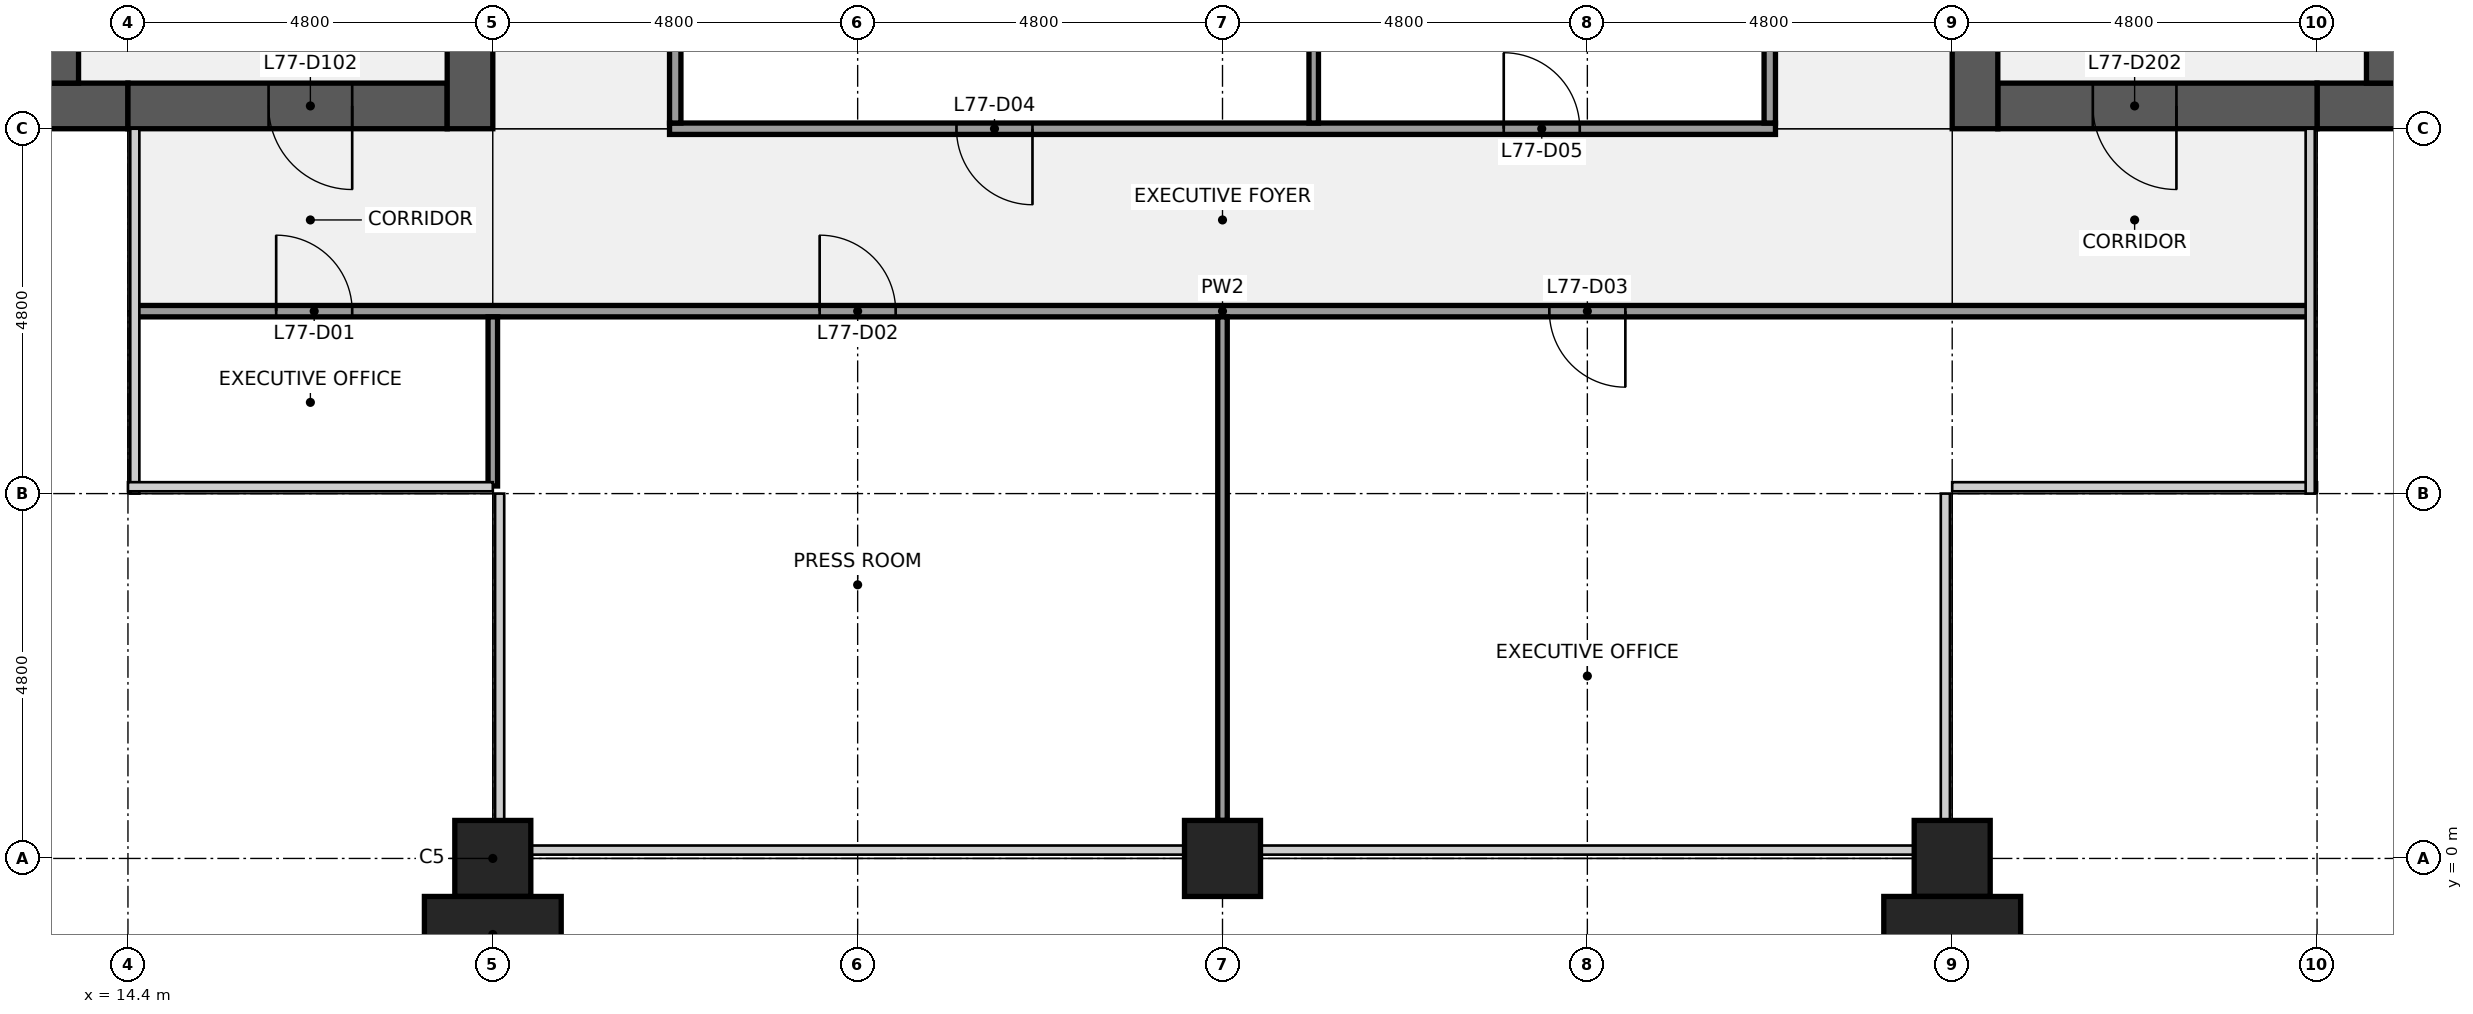
"""IFC4 building model, lengths in metres.
Left out: names, types, materials, properties, quantities, classifications, styles, units other than length and angle.
Written with IfcOpenShell. Run it as: python <this file> out.ifc"""

import sys

from ifc_helpers import new_model, si_unit, direction, frame, frame_2d, origin, origin_2d, place, context, subcontext, project, spatial, rectangle, extrude, element, fill, save


model = new_model("IFC4")
c1 = context("Model", 3, precision=1e-05, world=origin(), true_north=direction((0.0, 1.0)))
c2 = subcontext(c1, "Body", "Model", "MODEL_VIEW")
j1 = project(units=[si_unit("LENGTHUNIT", "METRE"), si_unit("PLANEANGLEUNIT", "RADIAN")], contexts=[c1])
p1 = place(None, origin())
s1 = spatial("IfcSite", under=j1, at=p1, CompositionType="ELEMENT")
p2 = place(p1, origin())
s2 = spatial("IfcBuilding", under=s1, at=p2, CompositionType="ELEMENT")
p3 = place(p2, frame((0.0, 0.0, 346.3)))
s3 = spatial("IfcBuildingStorey", under=s2, at=p3, CompositionType="ELEMENT", Elevation=346.3)
for number, where, z_axis, x_axis in (
    (1, (19.2, 0.0, 0.0), (0.0, 0.0, 1.0), (1.0, 0.0, 0.0)),
    (2, (28.8, 0.0, 0.0), (0.0, 0.0, 1.0), (1.0, 0.0, 0.0)),
    (3, (38.4, 0.0, 0.0), (0.0, 0.0, 1.0), (1.0, 0.0, 0.0)),
):
    element("IfcColumn", number, at=place(p3, frame(where, z_axis=z_axis, x_axis=x_axis)), inside=s3, PredefinedType="COLUMN", context=c2, shape_type="SweptSolid", body=[
        extrude(rectangle(XDim=1.0, YDim=1.0, at=origin_2d()), origin(), (0.0, 0.0, 1.0), 4.0),
    ])
p4 = place(p3, frame((14.4, 9.9, 0.0), z_axis=(0.0, 0.0, 1.0), x_axis=(-1.0, 0.0, 0.0)))
e4 = element("IfcWall", 4, at=p4, inside=s3, PredefinedType="SHEAR", context=c2, shape_type="SweptSolid", body=[
    extrude(rectangle(XDim=13.8, YDim=0.6, at=frame_2d((6.9, 0.0))), origin(), (0.0, 0.0, 1.0), 3.84),
])
p5 = place(p4, frame((6.3, 0.0, 0.9)))
e5 = element("IfcOpeningElement", 5, at=p5, cuts=e4, PredefinedType="OPENING", context=c2, shape_type="SweptSolid", body=[
    extrude(rectangle(XDim=1.8, YDim=1.5, at=frame_2d((0.9, 0.75))), frame((0.0, 0.31, 0.0), z_axis=(0.0, -1.0, 0.0), x_axis=(1.0, 0.0, 0.0)), (0.0, 0.0, 1.0), 0.62),
])
p6 = place(p4, frame((1.5, 0.0, 0.9)))
e6 = element("IfcOpeningElement", 6, at=p6, cuts=e4, PredefinedType="OPENING", context=c2, shape_type="SweptSolid", body=[
    extrude(rectangle(XDim=1.8, YDim=1.5, at=frame_2d((0.9, 0.75))), frame((0.0, 0.31, 0.0), z_axis=(0.0, -1.0, 0.0), x_axis=(1.0, 0.0, 0.0)), (0.0, 0.0, 1.0), 0.62),
])
p7 = place(p3, frame((18.6, 9.9, 0.0), z_axis=(0.0, 0.0, 1.0), x_axis=(-1.0, 0.0, 0.0)))
e7 = element("IfcWall", 7, at=p7, inside=s3, PredefinedType="SHEAR", context=c2, shape_type="SweptSolid", body=[
    extrude(rectangle(XDim=4.2, YDim=0.6, at=frame_2d((2.1, 0.0))), origin(), (0.0, 0.0, 1.0), 3.84),
])
p8 = place(p7, frame((1.25, 0.0, 0.0)))
e8 = element("IfcOpeningElement", 8, at=p8, cuts=e7, PredefinedType="OPENING", context=c2, shape_type="SweptSolid", body=[
    extrude(rectangle(XDim=1.1, YDim=2.1, at=frame_2d((0.55, 1.05))), frame((0.0, 0.31, 0.0), z_axis=(0.0, -1.0, 0.0), x_axis=(1.0, 0.0, 0.0)), (0.0, 0.0, 1.0), 0.62),
])
p9 = place(p3, frame((18.9, 38.4, 0.0), z_axis=(0.0, 0.0, 1.0), x_axis=(0.0, -1.0, 0.0)))
e9 = element("IfcWall", 9, at=p9, inside=s3, PredefinedType="SHEAR", context=c2, shape_type="SweptSolid", body=[
    extrude(rectangle(XDim=28.8, YDim=0.6, at=frame_2d((14.4, 0.0))), origin(), (0.0, 0.0, 1.0), 3.84),
])
p10 = place(p9, frame((18.3, 0.0, 0.0)))
e10 = element("IfcOpeningElement", 10, at=p10, cuts=e9, PredefinedType="OPENING", context=c2, shape_type="SweptSolid", body=[
    extrude(rectangle(XDim=1.8, YDim=2.1, at=frame_2d((0.9, 1.05))), frame((0.0, 0.31, 0.0), z_axis=(0.0, -1.0, 0.0), x_axis=(1.0, 0.0, 0.0)), (0.0, 0.0, 1.0), 0.62),
])
p11 = place(p9, frame((8.7, 0.0, 0.0)))
e11 = element("IfcOpeningElement", 11, at=p11, cuts=e9, PredefinedType="OPENING", context=c2, shape_type="SweptSolid", body=[
    extrude(rectangle(XDim=1.8, YDim=2.1, at=frame_2d((0.9, 1.05))), frame((0.0, 0.31, 0.0), z_axis=(0.0, -1.0, 0.0), x_axis=(1.0, 0.0, 0.0)), (0.0, 0.0, 1.0), 0.62),
])
p12 = place(p3, frame((6.25, 10.5, 0.0), z_axis=(0.0, 0.0, 1.0), x_axis=(1.0, 0.0, 0.0)))
e12 = element("IfcWall", 12, at=p12, inside=s3, PredefinedType="SHEAR", context=c2, shape_type="SweptSolid", body=[
    extrude(rectangle(XDim=7.5, YDim=0.6, at=frame_2d((3.75, 0.0))), origin(), (0.0, 0.0, 1.0), 3.84),
])
p13 = place(p3, frame((57.0, 9.9, 0.0), z_axis=(0.0, 0.0, 1.0), x_axis=(-1.0, 0.0, 0.0)))
e13 = element("IfcWall", 13, at=p13, inside=s3, PredefinedType="SHEAR", context=c2, shape_type="SweptSolid", body=[
    extrude(rectangle(XDim=13.8, YDim=0.6, at=frame_2d((6.9, 0.0))), origin(), (0.0, 0.0, 1.0), 3.84),
])
p14 = place(p13, frame((5.7, 0.0, 0.9)))
e14 = element("IfcOpeningElement", 14, at=p14, cuts=e13, PredefinedType="OPENING", context=c2, shape_type="SweptSolid", body=[
    extrude(rectangle(XDim=1.8, YDim=1.5, at=frame_2d((0.9, 0.75))), frame((0.0, 0.31, 0.0), z_axis=(0.0, -1.0, 0.0), x_axis=(1.0, 0.0, 0.0)), (0.0, 0.0, 1.0), 0.62),
])
p15 = place(p13, frame((10.5, 0.0, 0.9)))
e15 = element("IfcOpeningElement", 15, at=p15, cuts=e13, PredefinedType="OPENING", context=c2, shape_type="SweptSolid", body=[
    extrude(rectangle(XDim=1.8, YDim=1.5, at=frame_2d((0.9, 0.75))), frame((0.0, 0.31, 0.0), z_axis=(0.0, -1.0, 0.0), x_axis=(1.0, 0.0, 0.0)), (0.0, 0.0, 1.0), 0.62),
])
p16 = place(p3, frame((43.2, 9.9, 0.0), z_axis=(0.0, 0.0, 1.0), x_axis=(-1.0, 0.0, 0.0)))
e16 = element("IfcWall", 16, at=p16, inside=s3, PredefinedType="SHEAR", context=c2, shape_type="SweptSolid", body=[
    extrude(rectangle(XDim=4.2, YDim=0.6, at=frame_2d((2.1, 0.0))), origin(), (0.0, 0.0, 1.0), 3.84),
])
p17 = place(p16, frame((1.85, 0.0, 0.0)))
e17 = element("IfcOpeningElement", 17, at=p17, cuts=e16, PredefinedType="OPENING", context=c2, shape_type="SweptSolid", body=[
    extrude(rectangle(XDim=1.1, YDim=2.1, at=frame_2d((0.55, 1.05))), frame((0.0, 0.31, 0.0), z_axis=(0.0, -1.0, 0.0), x_axis=(1.0, 0.0, 0.0)), (0.0, 0.0, 1.0), 0.62),
])
p18 = place(p3, frame((38.7, 9.6, 0.0), z_axis=(0.0, 0.0, 1.0), x_axis=(0.0, 1.0, 0.0)))
e18 = element("IfcWall", 18, at=p18, inside=s3, PredefinedType="SHEAR", context=c2, shape_type="SweptSolid", body=[
    extrude(rectangle(XDim=28.8, YDim=0.6, at=frame_2d((14.4, 0.0))), origin(), (0.0, 0.0, 1.0), 3.84),
])
p19 = place(p18, frame((8.7, 0.0, 0.0)))
e19 = element("IfcOpeningElement", 19, at=p19, cuts=e18, PredefinedType="OPENING", context=c2, shape_type="SweptSolid", body=[
    extrude(rectangle(XDim=1.8, YDim=2.1, at=frame_2d((0.9, 1.05))), frame((0.0, 0.31, 0.0), z_axis=(0.0, -1.0, 0.0), x_axis=(1.0, 0.0, 0.0)), (0.0, 0.0, 1.0), 0.62),
])
p20 = place(p18, frame((18.3, 0.0, 0.0)))
e20 = element("IfcOpeningElement", 20, at=p20, cuts=e18, PredefinedType="OPENING", context=c2, shape_type="SweptSolid", body=[
    extrude(rectangle(XDim=1.8, YDim=2.1, at=frame_2d((0.9, 1.05))), frame((0.0, 0.31, 0.0), z_axis=(0.0, -1.0, 0.0), x_axis=(1.0, 0.0, 0.0)), (0.0, 0.0, 1.0), 0.62),
])
p21 = place(p3, frame((43.85, 10.5, 0.0), z_axis=(0.0, 0.0, 1.0), x_axis=(1.0, 0.0, 0.0)))
e21 = element("IfcWall", 21, at=p21, inside=s3, PredefinedType="SHEAR", context=c2, shape_type="SweptSolid", body=[
    extrude(rectangle(XDim=7.5, YDim=0.6, at=frame_2d((3.75, 0.0))), origin(), (0.0, 0.0, 1.0), 3.84),
])
p22 = place(p3, frame((14.5, 7.2, 0.0), z_axis=(0.0, 0.0, 1.0), x_axis=(1.0, 0.0, 0.0)))
e22 = element("IfcWall", 22, at=p22, inside=s3, PredefinedType="PARTITIONING", context=c2, shape_type="SweptSolid", body=[
    extrude(rectangle(XDim=28.6, YDim=0.15, at=frame_2d((14.3, 0.0))), origin(), (0.0, 0.0, 1.0), 2.849),
])
p23 = place(p22, frame((1.85, 0.0, 0.0)))
e23 = element("IfcOpeningElement", 23, at=p23, cuts=e22, PredefinedType="OPENING", context=c2, shape_type="SweptSolid", body=[
    extrude(rectangle(XDim=1.0, YDim=2.1, at=frame_2d((0.5, 1.05))), frame((0.0, 0.085, 0.0), z_axis=(0.0, -1.0, 0.0), x_axis=(1.0, 0.0, 0.0)), (0.0, 0.0, 1.0), 0.17),
])
p24 = place(p22, frame((9.0, 0.0, 0.0)))
e24 = element("IfcOpeningElement", 24, at=p24, cuts=e22, PredefinedType="OPENING", context=c2, shape_type="SweptSolid", body=[
    extrude(rectangle(XDim=1.0, YDim=2.1, at=frame_2d((0.5, 1.05))), frame((0.0, 0.085, 0.0), z_axis=(0.0, -1.0, 0.0), x_axis=(1.0, 0.0, 0.0)), (0.0, 0.0, 1.0), 0.17),
])
p25 = place(p22, frame((18.6, 0.0, 0.0)))
e25 = element("IfcOpeningElement", 25, at=p25, cuts=e22, PredefinedType="OPENING", context=c2, shape_type="SweptSolid", body=[
    extrude(rectangle(XDim=1.0, YDim=2.1, at=frame_2d((0.5, 1.05))), frame((0.0, 0.085, 0.0), z_axis=(0.0, -1.0, 0.0), x_axis=(1.0, 0.0, 0.0)), (0.0, 0.0, 1.0), 0.17),
])
p26 = place(p3, frame((21.525, 9.6, 0.0), z_axis=(0.0, 0.0, 1.0), x_axis=(1.0, 0.0, 0.0)))
e26 = element("IfcWall", 26, at=p26, inside=s3, PredefinedType="PARTITIONING", context=c2, shape_type="SweptSolid", body=[
    extrude(rectangle(XDim=14.55, YDim=0.15, at=frame_2d((7.275, 0.0))), origin(), (0.0, 0.0, 1.0), 2.849),
])
p27 = place(p26, frame((3.775, 0.0, 0.0)))
e27 = element("IfcOpeningElement", 27, at=p27, cuts=e26, PredefinedType="OPENING", context=c2, shape_type="SweptSolid", body=[
    extrude(rectangle(XDim=1.0, YDim=2.1, at=frame_2d((0.5, 1.05))), frame((0.0, 0.085, 0.0), z_axis=(0.0, -1.0, 0.0), x_axis=(1.0, 0.0, 0.0)), (0.0, 0.0, 1.0), 0.17),
])
p28 = place(p26, frame((10.975, 0.0, 0.0)))
e28 = element("IfcOpeningElement", 28, at=p28, cuts=e26, PredefinedType="OPENING", context=c2, shape_type="SweptSolid", body=[
    extrude(rectangle(XDim=1.0, YDim=2.1, at=frame_2d((0.5, 1.05))), frame((0.0, 0.085, 0.0), z_axis=(0.0, -1.0, 0.0), x_axis=(1.0, 0.0, 0.0)), (0.0, 0.0, 1.0), 0.17),
])
p29 = place(p3, frame((19.2, 4.9, 0.0), z_axis=(0.0, 0.0, 1.0), x_axis=(0.0, 1.0, 0.0)))
e29 = element("IfcWall", 29, at=p29, inside=s3, PredefinedType="PARTITIONING", context=c2, shape_type="SweptSolid", body=[
    extrude(rectangle(XDim=2.225, YDim=0.125, at=frame_2d((1.113, 0.0))), origin(), (0.0, 0.0, 1.0), 2.849),
])
p30 = place(p3, frame((21.6, 9.675, 0.0), z_axis=(0.0, 0.0, 1.0), x_axis=(0.0, 1.0, 0.0)))
e30 = element("IfcWall", 30, at=p30, inside=s3, PredefinedType="PARTITIONING", context=c2, shape_type="SweptSolid", body=[
    extrude(rectangle(XDim=4.65, YDim=0.15, at=frame_2d((2.325, 0.0))), origin(), (0.0, 0.0, 1.0), 2.849),
])
p31 = place(p3, frame((28.8, 0.5, 0.0), z_axis=(0.0, 0.0, 1.0), x_axis=(0.0, 1.0, 0.0)))
e31 = element("IfcWall", 31, at=p31, inside=s3, PredefinedType="PARTITIONING", context=c2, shape_type="SweptSolid", body=[
    extrude(rectangle(XDim=6.625, YDim=0.125, at=frame_2d((3.312, 0.0))), origin(), (0.0, 0.0, 1.0), 2.849),
])
p32 = place(p3, frame((30.0, 9.675, 0.0), z_axis=(0.0, 0.0, 1.0), x_axis=(0.0, 1.0, 0.0)))
e32 = element("IfcWall", 32, at=p32, inside=s3, PredefinedType="PARTITIONING", context=c2, shape_type="SweptSolid", body=[
    extrude(rectangle(XDim=4.662, YDim=0.125, at=frame_2d((2.331, 0.0))), origin(), (0.0, 0.0, 1.0), 2.849),
])
p33 = place(p3, frame((36.0, 9.675, 0.0), z_axis=(0.0, 0.0, 1.0), x_axis=(0.0, 1.0, 0.0)))
e33 = element("IfcWall", 33, at=p33, inside=s3, PredefinedType="PARTITIONING", context=c2, shape_type="SweptSolid", body=[
    extrude(rectangle(XDim=4.65, YDim=0.15, at=frame_2d((2.325, 0.0))), origin(), (0.0, 0.0, 1.0), 2.849),
])
for number, where, z_axis, x_axis in (
    (34, (19.2, -1.0, 0.0), (0.0, 0.0, 1.0), (1.0, 0.0, 0.0)),
    (35, (38.4, -1.0, 0.0), (0.0, 0.0, 1.0), (1.0, 0.0, 0.0)),
):
    element("IfcColumn", number, at=place(p3, frame(where, z_axis=z_axis, x_axis=x_axis)), inside=s3, PredefinedType="PILASTER", context=c2, shape_type="SweptSolid", body=[
        extrude(rectangle(XDim=1.8, YDim=1.0, at=origin_2d()), origin(), (0.0, 0.0, 1.0), 4.0),
    ])
p34 = place(p8, origin())
e36 = element("IfcDoor", 36, at=p34, inside=s3, OperationType="SINGLE_SWING_LEFT", PredefinedType="DOOR", context=c2, shape_type="SweptSolid", body=[
    extrude(rectangle(XDim=1.1, YDim=2.1, at=frame_2d((0.55, 1.05))), frame((0.0, 0.025, 0.0), z_axis=(0.0, -1.0, 0.0), x_axis=(1.0, 0.0, 0.0)), (0.0, 0.0, 1.0), 0.05),
])
fill(e8, e36)
p35 = place(p17, origin())
e37 = element("IfcDoor", 37, at=p35, inside=s3, OperationType="SINGLE_SWING_LEFT", PredefinedType="DOOR", context=c2, shape_type="SweptSolid", body=[
    extrude(rectangle(XDim=1.1, YDim=2.1, at=frame_2d((0.55, 1.05))), frame((0.0, 0.025, 0.0), z_axis=(0.0, -1.0, 0.0), x_axis=(1.0, 0.0, 0.0)), (0.0, 0.0, 1.0), 0.05),
])
fill(e17, e37)
p36 = place(p23, origin())
e38 = element("IfcDoor", 38, at=p36, inside=s3, OperationType="SINGLE_SWING_LEFT", PredefinedType="DOOR", context=c2, shape_type="SweptSolid", body=[
    extrude(rectangle(XDim=1.0, YDim=2.1, at=frame_2d((0.5, 1.05))), frame((0.0, 0.025, 0.0), z_axis=(0.0, -1.0, 0.0), x_axis=(1.0, 0.0, 0.0)), (0.0, 0.0, 1.0), 0.05),
])
fill(e23, e38)
p37 = place(p24, origin())
e39 = element("IfcDoor", 39, at=p37, inside=s3, OperationType="SINGLE_SWING_LEFT", PredefinedType="DOOR", context=c2, shape_type="SweptSolid", body=[
    extrude(rectangle(XDim=1.0, YDim=2.1, at=frame_2d((0.5, 1.05))), frame((0.0, 0.025, 0.0), z_axis=(0.0, -1.0, 0.0), x_axis=(1.0, 0.0, 0.0)), (0.0, 0.0, 1.0), 0.05),
])
fill(e24, e39)
p38 = place(p25, origin())
e40 = element("IfcDoor", 40, at=p38, inside=s3, OperationType="SINGLE_SWING_RIGHT", PredefinedType="DOOR", context=c2, shape_type="SweptSolid", body=[
    extrude(rectangle(XDim=1.0, YDim=2.1, at=frame_2d((0.5, 1.05))), frame((0.0, 0.025, 0.0), z_axis=(0.0, -1.0, 0.0), x_axis=(1.0, 0.0, 0.0)), (0.0, 0.0, 1.0), 0.05),
])
fill(e25, e40)
p39 = place(p27, origin())
e41 = element("IfcDoor", 41, at=p39, inside=s3, OperationType="SINGLE_SWING_RIGHT", PredefinedType="DOOR", context=c2, shape_type="SweptSolid", body=[
    extrude(rectangle(XDim=1.0, YDim=2.1, at=frame_2d((0.5, 1.05))), frame((0.0, 0.025, 0.0), z_axis=(0.0, -1.0, 0.0), x_axis=(1.0, 0.0, 0.0)), (0.0, 0.0, 1.0), 0.05),
])
fill(e27, e41)
p40 = place(p28, origin())
e42 = element("IfcDoor", 42, at=p40, inside=s3, OperationType="SINGLE_SWING_LEFT", PredefinedType="DOOR", context=c2, shape_type="SweptSolid", body=[
    extrude(rectangle(XDim=1.0, YDim=2.1, at=frame_2d((0.5, 1.05))), frame((0.0, 0.025, 0.0), z_axis=(0.0, -1.0, 0.0), x_axis=(1.0, 0.0, 0.0)), (0.0, 0.0, 1.0), 0.05),
])
fill(e28, e42)
save(model, sys.argv[1])
